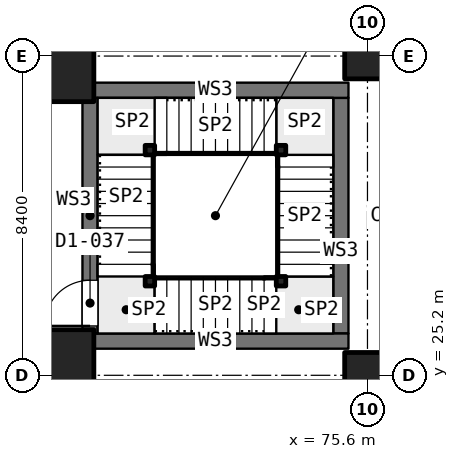
"""IFC4 building model, lengths in metres.
Left out: names, types, materials, properties, quantities, classifications, styles, units other than length and angle.
Written with IfcOpenShell. Run it as: python <this file> out.ifc"""

import sys

from ifc_helpers import new_model, si_unit, direction, frame, frame_2d, origin, origin_2d, place, context, subcontext, project, spatial, rectangle, extrude, element, fill, save


model = new_model("IFC4")
c1 = context("Model", 3, precision=1e-05, world=origin(), true_north=direction((0.0, 1.0)))
c2 = subcontext(c1, "Body", "Model", "MODEL_VIEW")
j1 = project(units=[si_unit("LENGTHUNIT", "METRE"), si_unit("PLANEANGLEUNIT", "RADIAN")], contexts=[c1])
p1 = place(None, origin())
s1 = spatial("IfcSite", under=j1, at=p1, CompositionType="ELEMENT")
p2 = place(p1, origin())
s2 = spatial("IfcBuilding", under=s1, at=p2, CompositionType="ELEMENT")
p3 = place(p2, frame((0.0, 0.0, 10.4)))
s3 = spatial("IfcBuildingStorey", under=s2, at=p3, CompositionType="ELEMENT", Elevation=10.4)
for number, where, z_axis, x_axis in (
    (1, (67.2, 25.2, 0.0), (0.0, 0.0, 1.0), (1.0, 0.0, 0.0)),
    (2, (67.2, 33.6, 0.0), (0.0, 0.0, 1.0), (1.0, 0.0, 0.0)),
):
    element("IfcColumn", number, at=place(p3, frame(where, z_axis=z_axis, x_axis=x_axis)), inside=s3, PredefinedType="COLUMN", context=c2, shape_type="SweptSolid", body=[
        extrude(rectangle(XDim=2.4, YDim=2.4, at=origin_2d()), origin(), (0.0, 0.0, 1.0), 5.0),
    ])
for number, where, z_axis, x_axis in (
    (3, (75.6, 25.2, 0.0), (0.0, 0.0, 1.0), (1.0, 0.0, 0.0)),
    (4, (75.6, 33.6, 0.0), (0.0, 0.0, 1.0), (1.0, 0.0, 0.0)),
):
    element("IfcColumn", number, at=place(p3, frame(where, z_axis=z_axis, x_axis=x_axis)), inside=s3, PredefinedType="COLUMN", context=c2, shape_type="SweptSolid", body=[
        extrude(rectangle(XDim=1.2, YDim=1.2, at=origin_2d()), origin(), (0.0, 0.0, 1.0), 5.0),
    ])
for number, where, z_axis, x_axis in (
    (5, (68.1, 26.1, 0.0), (0.0, 0.0, 1.0), (1.0, 0.0, 0.0)),
    (6, (68.1, 32.7, 0.0), (0.0, 0.0, 1.0), (1.0, 0.0, 0.0)),
):
    element("IfcWall", number, at=place(p3, frame(where, z_axis=z_axis, x_axis=x_axis)), inside=s3, PredefinedType="SOLIDWALL", context=c2, shape_type="SweptSolid", body=[
        extrude(rectangle(XDim=7.0, YDim=0.4, at=frame_2d((3.5, 0.0))), origin(), (0.0, 0.0, 1.0), 4.7),
    ])
p4 = place(p3, frame((68.3, 26.3, 0.0), z_axis=(0.0, 0.0, 1.0), x_axis=(0.0, 1.0, 0.0)))
e7 = element("IfcWall", 7, at=p4, inside=s3, PredefinedType="SOLIDWALL", context=c2, shape_type="SweptSolid", body=[
    extrude(rectangle(XDim=6.2, YDim=0.4, at=frame_2d((3.1, 0.0))), origin(), (0.0, 0.0, 1.0), 4.7),
])
p5 = place(p4, frame((0.2, 0.0, 0.0)))
e8 = element("IfcOpeningElement", 8, at=p5, cuts=e7, PredefinedType="OPENING", context=c2, shape_type="SweptSolid", body=[
    extrude(rectangle(XDim=1.2, YDim=2.1, at=frame_2d((0.6, 1.05))), frame((0.0, 0.21, 0.0), z_axis=(0.0, -1.0, 0.0), x_axis=(1.0, 0.0, 0.0)), (0.0, 0.0, 1.0), 0.42),
])
p6 = place(p3, frame((74.9, 26.3, 0.0), z_axis=(0.0, 0.0, 1.0), x_axis=(0.0, 1.0, 0.0)))
e9 = element("IfcWall", 9, at=p6, inside=s3, PredefinedType="SOLIDWALL", context=c2, shape_type="SweptSolid", body=[
    extrude(rectangle(XDim=6.2, YDim=0.4, at=frame_2d((3.1, 0.0))), origin(), (0.0, 0.0, 1.0), 4.7),
])
for number, where, z_axis, x_axis in (
    (10, (69.875, 27.675, 0.0), (0.0, 0.0, 1.0), (1.0, 0.0, 0.0)),
    (11, (73.325, 27.675, 0.0), (0.0, 0.0, 1.0), (1.0, 0.0, 0.0)),
    (12, (73.325, 31.125, 0.0), (0.0, 0.0, 1.0), (1.0, 0.0, 0.0)),
    (13, (69.875, 31.125, 0.0), (0.0, 0.0, 1.0), (1.0, 0.0, 0.0)),
):
    element("IfcColumn", number, at=place(p3, frame(where, z_axis=z_axis, x_axis=x_axis)), inside=s3, PredefinedType="COLUMN", context=c2, shape_type="SweptSolid", body=[
        extrude(rectangle(XDim=0.25, YDim=0.25, at=origin_2d()), origin(), (0.0, 0.0, 1.0), 5.0),
    ])
p7 = place(p5, origin())
e14 = element("IfcDoor", 14, at=p7, inside=s3, OperationType="SINGLE_SWING_RIGHT", PredefinedType="DOOR", context=c2, shape_type="SweptSolid", body=[
    extrude(rectangle(XDim=1.2, YDim=2.1, at=frame_2d((0.6, 1.05))), frame((0.0, 0.025, 0.0), z_axis=(0.0, -1.0, 0.0), x_axis=(1.0, 0.0, 0.0)), (0.0, 0.0, 1.0), 0.05),
])
fill(e8, e14)
save(model, sys.argv[1])
